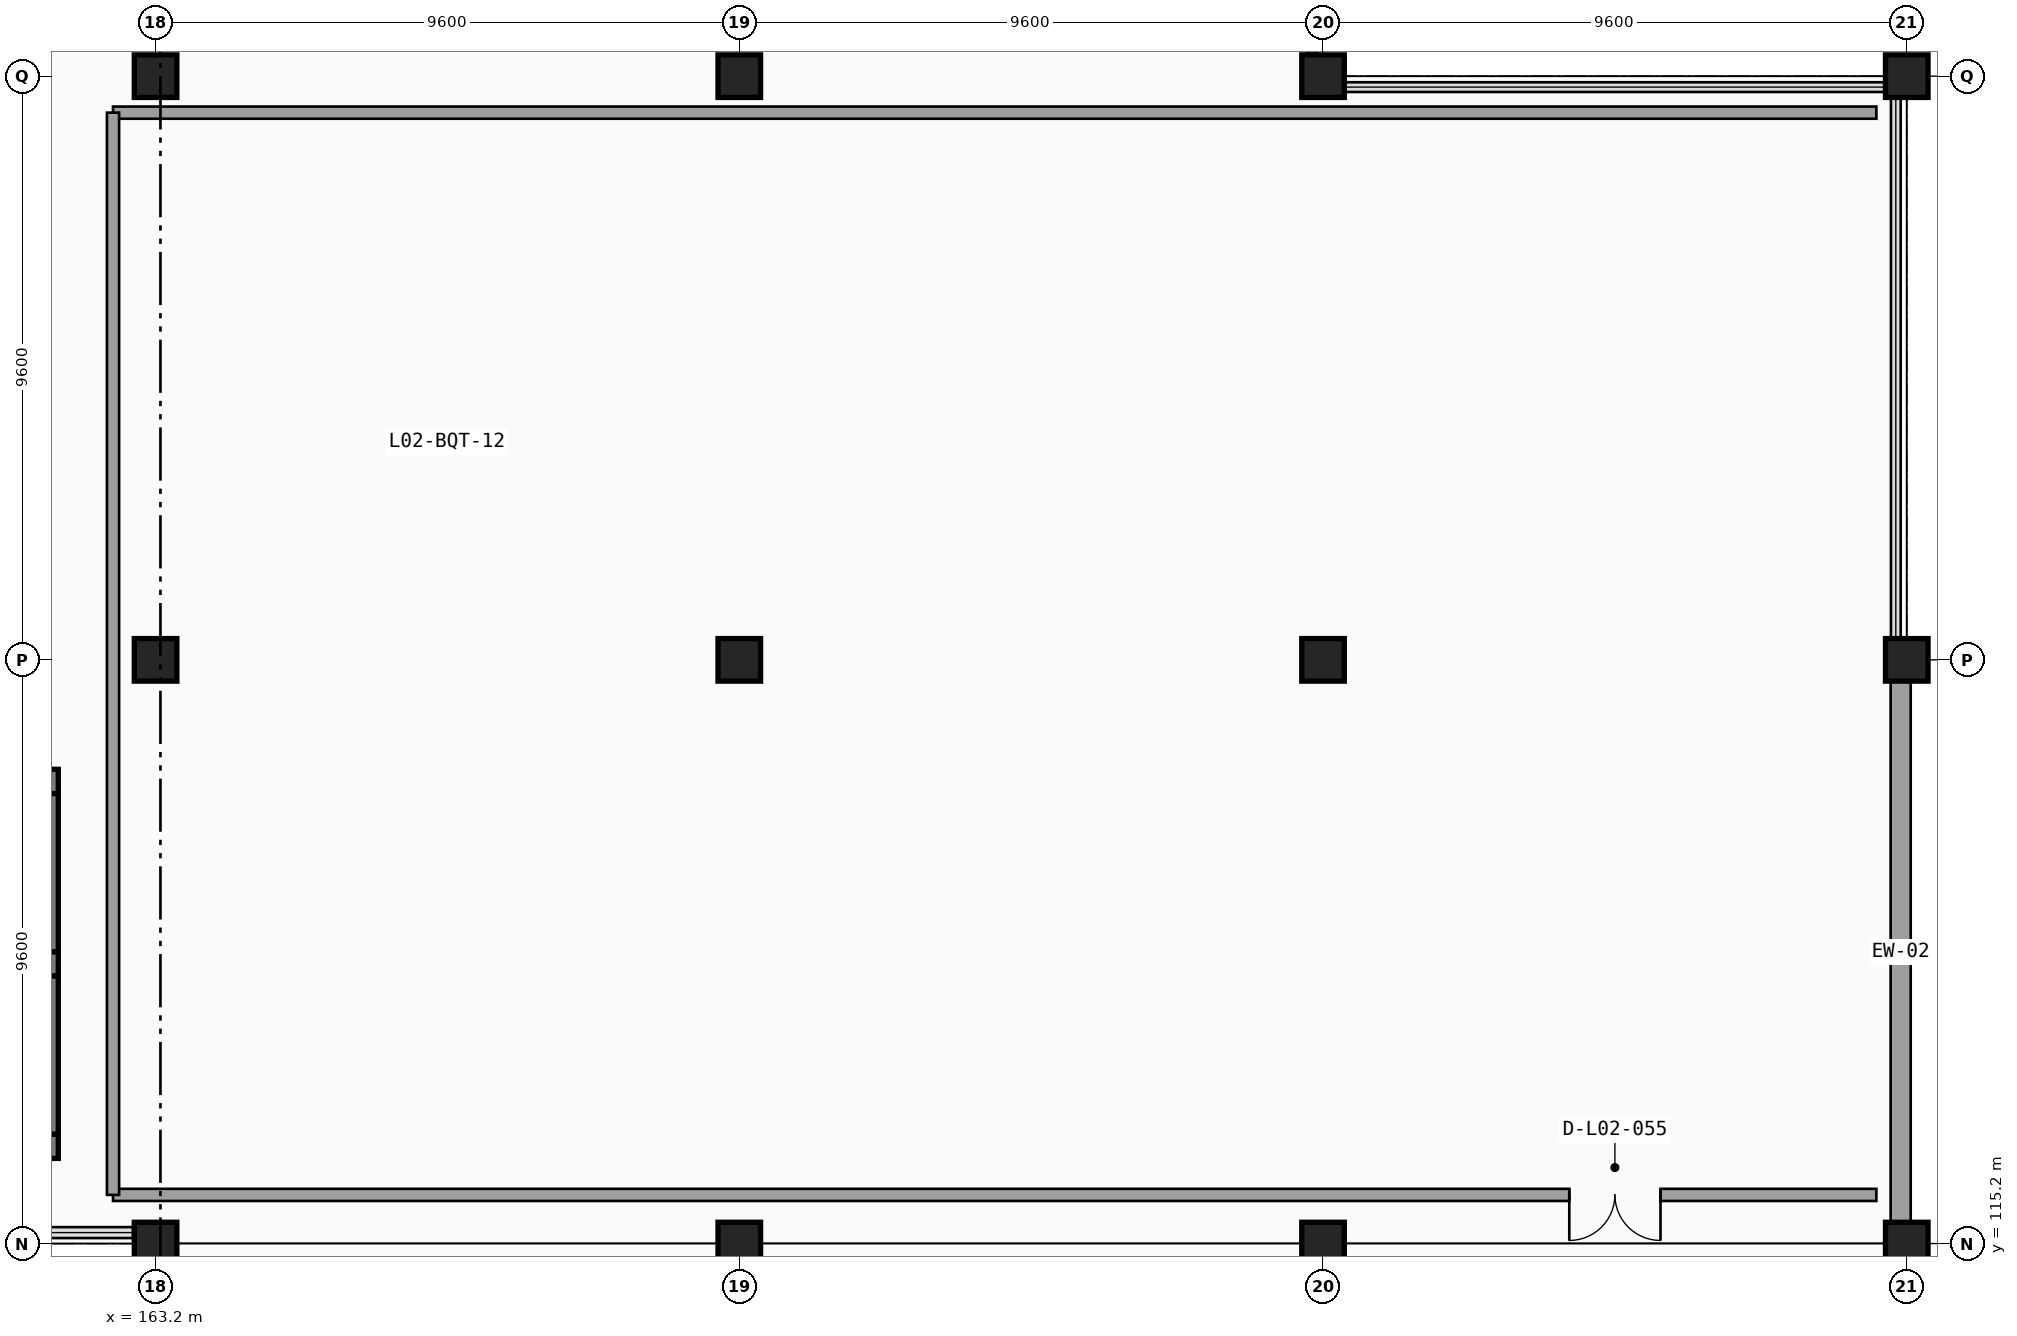
"""IFC4 building model, lengths in metres.
Left out: names, types, materials, properties, quantities, classifications, styles, units other than length and angle.
Written with IfcOpenShell. Run it as: python <this file> out.ifc"""

import sys

from ifc_helpers import new_model, si_unit, direction, frame, frame_2d, origin, origin_2d, place, context, subcontext, project, spatial, rectangle, extrude, element, fill, save


model = new_model("IFC4")
c1 = context("Model", 3, precision=1e-05, world=origin(), true_north=direction((0.0, 1.0)))
c2 = subcontext(c1, "Body", "Model", "MODEL_VIEW")
j1 = project(units=[si_unit("LENGTHUNIT", "METRE"), si_unit("PLANEANGLEUNIT", "RADIAN")], contexts=[c1])
p1 = place(None, origin())
s1 = spatial("IfcSite", under=j1, at=p1, CompositionType="ELEMENT")
p2 = place(p1, origin())
s2 = spatial("IfcBuilding", under=s1, at=p2, CompositionType="ELEMENT")
p3 = place(p2, frame((0.0, 0.0, 9.6)))
s3 = spatial("IfcBuildingStorey", under=s2, at=p3, CompositionType="ELEMENT", Elevation=9.6)
for number, where, z_axis, x_axis in (
    (1, (163.2, 115.2, 0.0), (0.0, 0.0, 1.0), (1.0, 0.0, 0.0)),
    (2, (163.2, 124.8, 0.0), (0.0, 0.0, 1.0), (1.0, 0.0, 0.0)),
    (3, (163.2, 134.4, 0.0), (0.0, 0.0, 1.0), (1.0, 0.0, 0.0)),
    (4, (172.8, 115.2, 0.0), (0.0, 0.0, 1.0), (1.0, 0.0, 0.0)),
    (5, (172.8, 124.8, 0.0), (0.0, 0.0, 1.0), (1.0, 0.0, 0.0)),
    (6, (172.8, 134.4, 0.0), (0.0, 0.0, 1.0), (1.0, 0.0, 0.0)),
    (7, (182.4, 115.2, 0.0), (0.0, 0.0, 1.0), (1.0, 0.0, 0.0)),
    (8, (182.4, 124.8, 0.0), (0.0, 0.0, 1.0), (1.0, 0.0, 0.0)),
    (9, (182.4, 134.4, 0.0), (0.0, 0.0, 1.0), (1.0, 0.0, 0.0)),
    (10, (192.0, 115.2, 0.0), (0.0, 0.0, 1.0), (1.0, 0.0, 0.0)),
    (11, (192.0, 124.8, 0.0), (0.0, 0.0, 1.0), (1.0, 0.0, 0.0)),
    (12, (192.0, 134.4, 0.0), (0.0, 0.0, 1.0), (1.0, 0.0, 0.0)),
):
    element("IfcColumn", number, at=place(p3, frame(where, z_axis=z_axis, x_axis=x_axis)), inside=s3, PredefinedType="COLUMN", context=c2, shape_type="SweptSolid", body=[
        extrude(rectangle(XDim=0.7, YDim=0.7, at=origin_2d()), origin(), (0.0, 0.0, 1.0), 4.5),
    ])
p4 = place(p3, frame((191.82, 105.6, 0.0), z_axis=(0.0, 0.0, 1.0), x_axis=(0.0, 1.0, 0.0)))
e13 = element("IfcWall", 13, at=p4, inside=s3, PredefinedType="SOLIDWALL", context=c2, shape_type="SweptSolid", body=[
    extrude(rectangle(XDim=9.6, YDim=0.29, at=frame_2d((4.8, 0.0))), origin(), (0.0, 0.0, 1.0), 3.293),
])
p5 = place(p4, frame((3.933, 0.0, 0.95), z_axis=(0.0, 0.0, 1.0), x_axis=(-1.0, 0.0, 0.0)))
e14 = element("IfcOpeningElement", 14, at=p5, cuts=e13, PredefinedType="OPENING", context=c2, shape_type="SweptSolid", body=[
    extrude(rectangle(XDim=2.2, YDim=2.1, at=frame_2d((1.1, 1.05))), frame((0.0, 0.155, 0.0), z_axis=(0.0, -1.0, 0.0), x_axis=(1.0, 0.0, 0.0)), (0.0, 0.0, 1.0), 0.31),
])
p6 = place(p4, frame((7.867, 0.0, 0.95), z_axis=(0.0, 0.0, 1.0), x_axis=(-1.0, 0.0, 0.0)))
e15 = element("IfcOpeningElement", 15, at=p6, cuts=e13, PredefinedType="OPENING", context=c2, shape_type="SweptSolid", body=[
    extrude(rectangle(XDim=2.2, YDim=2.1, at=frame_2d((1.1, 1.05))), frame((0.0, 0.155, 0.0), z_axis=(0.0, -1.0, 0.0), x_axis=(1.0, 0.0, 0.0)), (0.0, 0.0, 1.0), 0.31),
])
p7 = place(p3, frame((191.9, 115.2, 0.0), z_axis=(0.0, 0.0, 1.0), x_axis=(0.0, 1.0, 0.0)))
e16 = element("IfcWall", 16, at=p7, inside=s3, PredefinedType="SOLIDWALL", context=c2, shape_type="SweptSolid", body=[
    extrude(rectangle(XDim=9.6, YDim=0.33, at=frame_2d((4.8, 0.0))), origin(), (0.0, 0.0, 1.0), 3.293),
])
for number, where, z_axis, x_axis in (
    (17, (158.4, 116.8, 0.0), (0.0, 0.0, 1.0), (1.0, 0.0, 0.0)),
    (18, (161.6, 119.8, 0.0), (0.0, 0.0, 1.0), (-1.0, 0.0, 0.0)),
):
    element("IfcWall", number, at=place(p3, frame(where, z_axis=z_axis, x_axis=x_axis)), inside=s3, PredefinedType="SHEAR", context=c2, shape_type="SweptSolid", body=[
        extrude(rectangle(XDim=3.2, YDim=0.4, at=frame_2d((1.6, 0.0))), origin(), (0.0, 0.0, 1.0), 4.22),
    ])
p8 = place(p3, frame((161.4, 117.0, 0.0), z_axis=(0.0, 0.0, 1.0), x_axis=(0.0, 1.0, 0.0)))
e19 = element("IfcWall", 19, at=p8, inside=s3, PredefinedType="SHEAR", context=c2, shape_type="SweptSolid", body=[
    extrude(rectangle(XDim=2.6, YDim=0.4, at=frame_2d((1.3, 0.0))), origin(), (0.0, 0.0, 1.0), 4.22),
])
p9 = place(p3, frame((161.6, 122.8, 0.0), z_axis=(0.0, 0.0, 1.0), x_axis=(-1.0, 0.0, 0.0)))
e20 = element("IfcWall", 20, at=p9, inside=s3, PredefinedType="SHEAR", context=c2, shape_type="SweptSolid", body=[
    extrude(rectangle(XDim=3.2, YDim=0.4, at=frame_2d((1.6, 0.0))), origin(), (0.0, 0.0, 1.0), 4.22),
])
p10 = place(p3, frame((161.4, 120.0, 0.0), z_axis=(0.0, 0.0, 1.0), x_axis=(0.0, 1.0, 0.0)))
e21 = element("IfcWall", 21, at=p10, inside=s3, PredefinedType="SHEAR", context=c2, shape_type="SweptSolid", body=[
    extrude(rectangle(XDim=2.6, YDim=0.4, at=frame_2d((1.3, 0.0))), origin(), (0.0, 0.0, 1.0), 4.22),
])
p11 = place(p3, frame((162.5, 133.8, 0.0), z_axis=(0.0, 0.0, 1.0), x_axis=(1.0, 0.0, 0.0)))
e22 = element("IfcWall", 22, at=p11, inside=s3, PredefinedType="PARTITIONING", context=c2, shape_type="SweptSolid", body=[
    extrude(rectangle(XDim=29.0, YDim=0.2, at=frame_2d((14.5, 0.0))), origin(), (0.0, 0.0, 1.0), 3.47),
])
p12 = place(p3, frame((191.5, 116.0, 0.0), z_axis=(0.0, 0.0, 1.0), x_axis=(-1.0, 0.0, 0.0)))
e23 = element("IfcWall", 23, at=p12, inside=s3, PredefinedType="PARTITIONING", context=c2, shape_type="SweptSolid", body=[
    extrude(rectangle(XDim=29.0, YDim=0.2, at=frame_2d((14.5, 0.0))), origin(), (0.0, 0.0, 1.0), 3.293),
])
p13 = place(p12, frame((3.55, 0.0, 0.0), z_axis=(0.0, 0.0, 1.0), x_axis=(1.0, 0.0, 0.0)))
e24 = element("IfcOpeningElement", 24, at=p13, cuts=e23, PredefinedType="OPENING", context=c2, shape_type="SweptSolid", body=[
    extrude(rectangle(XDim=1.5, YDim=2.25, at=frame_2d((0.75, 1.125))), frame((0.0, 0.11, 0.0), z_axis=(0.0, -1.0, 0.0), x_axis=(1.0, 0.0, 0.0)), (0.0, 0.0, 1.0), 0.22),
])
p14 = place(p3, frame((162.5, 116.0, 0.0), z_axis=(0.0, 0.0, 1.0), x_axis=(0.0, 1.0, 0.0)))
e25 = element("IfcWall", 25, at=p14, inside=s3, PredefinedType="PARTITIONING", context=c2, shape_type="SweptSolid", body=[
    extrude(rectangle(XDim=17.8, YDim=0.2, at=frame_2d((8.9, 0.0))), origin(), (0.0, 0.0, 1.0), 3.466),
])
p15 = place(p13, origin())
e26 = element("IfcDoor", 26, at=p15, inside=s3, OperationType="DOUBLE_DOOR_SINGLE_SWING", PredefinedType="DOOR", context=c2, shape_type="SweptSolid", body=[
    extrude(rectangle(XDim=1.5, YDim=2.25, at=frame_2d((0.75, 1.125))), frame((0.0, 0.025, 0.0), z_axis=(0.0, -1.0, 0.0), x_axis=(1.0, 0.0, 0.0)), (0.0, 0.0, 1.0), 0.05),
])
fill(e24, e26)
save(model, sys.argv[1])
